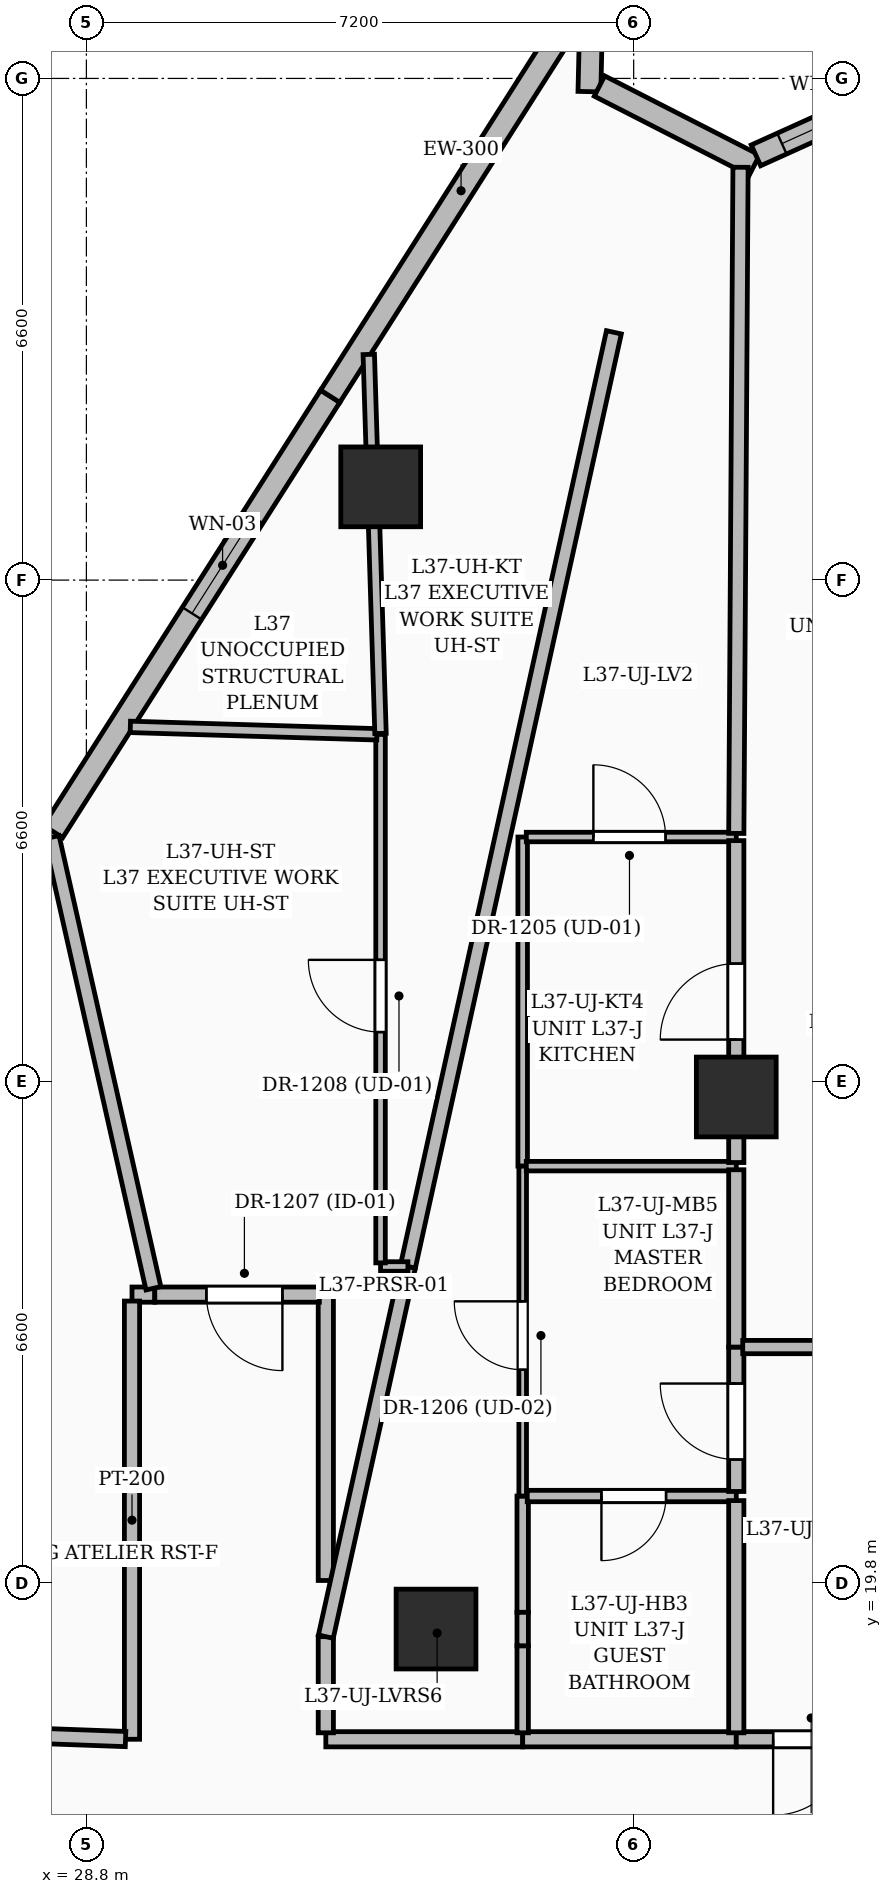
"""IFC4 building model, lengths in metres.
Left out: names, types, materials, properties, quantities, classifications, styles, units other than length and angle.
Written with IfcOpenShell. Run it as: python <this file> out.ifc"""

import sys

from ifc_helpers import new_model, si_unit, direction, frame, frame_2d, origin, origin_2d, place, context, subcontext, project, spatial, rectangle, extrude, element, fill, save


model = new_model("IFC4")
c1 = context("Model", 3, precision=1e-05, world=origin(), true_north=direction((0.0, 1.0)))
c2 = subcontext(c1, "Body", "Model", "MODEL_VIEW")
j1 = project(units=[si_unit("LENGTHUNIT", "METRE"), si_unit("PLANEANGLEUNIT", "RADIAN")], contexts=[c1])
p1 = place(None, origin())
s1 = spatial("IfcSite", under=j1, at=p1, CompositionType="ELEMENT")
p2 = place(p1, origin())
s2 = spatial("IfcBuilding", under=s1, at=p2, CompositionType="ELEMENT")
p3 = place(p2, frame((0.0, 0.0, 146.4)))
s3 = spatial("IfcBuildingStorey", under=s2, at=p3, CompositionType="ELEMENT", Elevation=146.4)
for number, where, z_axis, x_axis in (
    (1, (37.35, 26.2, 0.0), (0.0, 0.0, 1.0), (1.0, 0.0, 0.0)),
    (2, (33.4, 19.2, 0.0), (0.0, 0.0, 1.0), (1.0, 0.0, 0.0)),
    (3, (32.672, 34.227, 0.0), (0.0, 0.0, 1.0), (1.0, 0.0, 0.0)),
):
    element("IfcColumn", number, at=place(p3, frame(where, z_axis=z_axis, x_axis=x_axis)), inside=s3, PredefinedType="COLUMN", context=c2, shape_type="SweptSolid", body=[
        extrude(rectangle(XDim=1.05, YDim=1.05, at=origin_2d()), origin(), (0.0, 0.0, 1.0), 3.6),
    ])
p4 = place(p3, frame((28.361, 29.692, 0.0), z_axis=(0.0, 0.0, 1.0), x_axis=(0.537133761371, 0.843497079068, 0.0)))
e4 = element("IfcWall", 4, at=p4, inside=s3, PredefinedType="SOLIDWALL", context=c2, shape_type="SweptSolid", body=[
    extrude(rectangle(XDim=6.789, YDim=0.3, at=frame_2d((3.395, 0.0))), origin(), (0.0, 0.0, 1.0), 3.35),
])
p5 = place(p4, frame((3.403, 0.0, 0.6)))
e5 = element("IfcOpeningElement", 5, at=p5, cuts=e4, PredefinedType="OPENING", context=c2, shape_type="SweptSolid", body=[
    extrude(rectangle(XDim=1.5, YDim=2.1, at=frame_2d((0.75, 1.05))), frame((0.0, 0.16, 0.0), z_axis=(0.0, -1.0, 0.0), x_axis=(1.0, 0.0, 0.0)), (0.0, 0.0, 1.0), 0.32),
])
p6 = place(p3, frame((32.008, 35.418, 0.0), z_axis=(0.0, 0.0, 1.0), x_axis=(0.537080002797, 0.84353130979, 0.0)))
e6 = element("IfcWall", 6, at=p6, inside=s3, PredefinedType="SOLIDWALL", context=c2, shape_type="SweptSolid", body=[
    extrude(rectangle(XDim=6.411, YDim=0.3, at=frame_2d((3.206, 0.0))), origin(), (0.0, 0.0, 1.0), 3.35),
])
p7 = place(p3, frame((35.441, 40.391, 0.0), z_axis=(0.0, 0.0, 1.0), x_axis=(-0.023772687739, -0.999717389725, 0.0)))
e7 = element("IfcWall", 7, at=p7, inside=s3, PredefinedType="SOLIDWALL", context=c2, shape_type="SweptSolid", body=[
    extrude(rectangle(XDim=0.965, YDim=0.3, at=frame_2d((0.483, 0.0))), origin(), (0.0, 0.0, 1.0), 3.35),
])
p8 = place(p3, frame((35.55, 39.5, 0.0), z_axis=(0.0, 0.0, 1.0), x_axis=(0.890379913817, -0.455218199408, 0.0)))
e8 = element("IfcWall", 8, at=p8, inside=s3, PredefinedType="SOLIDWALL", context=c2, shape_type="SweptSolid", body=[
    extrude(rectangle(XDim=2.289, YDim=0.3, at=frame_2d((1.144, 0.0))), origin(), (0.0, 0.0, 1.0), 3.35),
])
p9 = place(p3, frame((37.609, 38.588, 0.0), z_axis=(0.0, 0.0, 1.0), x_axis=(0.911273073729, 0.411802604528, 0.0)))
e9 = element("IfcWall", 9, at=p9, inside=s3, PredefinedType="SOLIDWALL", context=c2, shape_type="SweptSolid", body=[
    extrude(rectangle(XDim=2.272, YDim=0.3, at=frame_2d((1.136, 0.0))), origin(), (0.0, 0.0, 1.0), 3.35),
])
p10 = place(p9, frame((0.375, 0.0, 0.8)))
e10 = element("IfcOpeningElement", 10, at=p10, cuts=e9, PredefinedType="OPENING", context=c2, shape_type="SweptSolid", body=[
    extrude(rectangle(XDim=1.2, YDim=1.8, at=frame_2d((0.6, 0.9))), frame((0.0, 0.16, 0.0), z_axis=(0.0, -1.0, 0.0), x_axis=(1.0, 0.0, 0.0)), (0.0, 0.0, 1.0), 0.32),
])
p11 = place(p3, frame((29.7, 23.6, 0.0), z_axis=(0.0, 0.0, 1.0), x_axis=(-1.0, 0.0, 0.0)))
e11 = element("IfcWall", 11, at=p11, inside=s3, PredefinedType="PARTITIONING", context=c2, shape_type="SweptSolid", body=[
    extrude(rectangle(XDim=0.3, YDim=0.2, at=frame_2d((0.15, 0.0))), origin(), (0.0, 0.0, 1.0), 2.393),
])
p12 = place(p3, frame((29.4, 23.515, 0.0), z_axis=(0.0, 0.0, 1.0), x_axis=(0.0, -1.0, 0.0)))
e12 = element("IfcWall", 12, at=p12, inside=s3, PredefinedType="PARTITIONING", context=c2, shape_type="SweptSolid", body=[
    extrude(rectangle(XDim=5.765, YDim=0.2, at=frame_2d((2.882, 0.0))), origin(), (0.0, 0.0, 1.0), 2.393),
])
p13 = place(p3, frame((29.315, 17.753, 0.0), z_axis=(0.0, 0.0, 1.0), x_axis=(-0.999333344418, 0.036508447439, 0.0)))
e13 = element("IfcWall", 13, at=p13, inside=s3, PredefinedType="PARTITIONING", context=c2, shape_type="SweptSolid", body=[
    extrude(rectangle(XDim=8.219, YDim=0.2, at=frame_2d((4.109, 0.0))), origin(), (0.0, 0.0, 1.0), 2.393),
])
p14 = place(p13, frame((3.287, 0.0, 0.0)))
e14 = element("IfcOpeningElement", 14, at=p14, cuts=e13, PredefinedType="OPENING", context=c2, shape_type="SweptSolid", body=[
    extrude(rectangle(XDim=1.6, YDim=2.3, at=frame_2d((0.8, 1.15))), frame((0.0, 0.11, 0.0), z_axis=(0.0, -1.0, 0.0), x_axis=(1.0, 0.0, 0.0)), (0.0, 0.0, 1.0), 0.22),
])
p15 = place(p3, frame((34.54, 17.75, 0.0), z_axis=(0.0, 0.0, 1.0), x_axis=(-1.0, 0.0, 0.0)))
e15 = element("IfcWall", 15, at=p15, inside=s3, PredefinedType="PARTITIONING", context=c2, shape_type="SweptSolid", body=[
    extrude(rectangle(XDim=2.59, YDim=0.2, at=frame_2d((1.295, 0.0))), origin(), (0.0, 0.0, 1.0), 2.436),
])
p16 = place(p3, frame((31.95, 17.835, 0.0), z_axis=(0.0, 0.0, 1.0), x_axis=(0.0, 1.0, 0.0)))
e16 = element("IfcWall", 16, at=p16, inside=s3, PredefinedType="PARTITIONING", context=c2, shape_type="SweptSolid", body=[
    extrude(rectangle(XDim=1.265, YDim=0.2, at=frame_2d((0.633, 0.0))), origin(), (0.0, 0.0, 1.0), 3.35),
])
p17 = place(p3, frame((37.35, 17.75, 0.0), z_axis=(0.0, 0.0, 1.0), x_axis=(-1.0, 0.0, 0.0)))
e17 = element("IfcWall", 17, at=p17, inside=s3, PredefinedType="PARTITIONING", context=c2, shape_type="SweptSolid", body=[
    extrude(rectangle(XDim=2.81, YDim=0.2, at=frame_2d((1.405, 0.0))), origin(), (0.0, 0.0, 1.0), 3.35),
])
p18 = place(p3, frame((31.95, 19.839, 0.0), z_axis=(0.0, 0.0, 1.0), x_axis=(0.0, 1.0, 0.0)))
e18 = element("IfcWall", 18, at=p18, inside=s3, PredefinedType="PARTITIONING", context=c2, shape_type="SweptSolid", body=[
    extrude(rectangle(XDim=3.761, YDim=0.2, at=frame_2d((1.88, 0.0))), origin(), (0.0, 0.0, 1.0), 2.393),
])
p19 = place(p3, frame((31.865, 23.6, 0.0), z_axis=(0.0, 0.0, 1.0), x_axis=(-1.0, 0.0, 0.0)))
e19 = element("IfcWall", 19, at=p19, inside=s3, PredefinedType="PARTITIONING", context=c2, shape_type="SweptSolid", body=[
    extrude(rectangle(XDim=2.165, YDim=0.2, at=frame_2d((1.083, 0.0))), origin(), (0.0, 0.0, 1.0), 2.787),
])
p20 = place(p19, frame((0.486, 0.0, 0.0)))
e20 = element("IfcOpeningElement", 20, at=p20, cuts=e19, PredefinedType="OPENING", context=c2, shape_type="SweptSolid", body=[
    extrude(rectangle(XDim=1.0, YDim=2.2, at=frame_2d((0.5, 1.1))), frame((0.0, 0.11, 0.0), z_axis=(0.0, -1.0, 0.0), x_axis=(1.0, 0.0, 0.0)), (0.0, 0.0, 1.0), 0.22),
])
p21 = place(p3, frame((39.32, 17.75, 0.0), z_axis=(0.0, 0.0, 1.0), x_axis=(-1.0, 0.0, 0.0)))
e21 = element("IfcWall", 21, at=p21, inside=s3, PredefinedType="PARTITIONING", context=c2, shape_type="SweptSolid", body=[
    extrude(rectangle(XDim=1.97, YDim=0.2, at=frame_2d((0.985, 0.0))), origin(), (0.0, 0.0, 1.0), 3.35),
])
p22 = place(p21, frame((0.485, 0.0, 0.0)))
e22 = element("IfcOpeningElement", 22, at=p22, cuts=e21, PredefinedType="OPENING", context=c2, shape_type="SweptSolid", body=[
    extrude(rectangle(XDim=1.0, YDim=2.2, at=frame_2d((0.5, 1.1))), frame((0.0, 0.11, 0.0), z_axis=(0.0, -1.0, 0.0), x_axis=(1.0, 0.0, 0.0)), (0.0, 0.0, 1.0), 0.22),
])
p23 = place(p3, frame((29.682, 23.683, 0.0), z_axis=(0.0, 0.0, 1.0), x_axis=(-0.22009949455, 0.97547742798, 0.0)))
e23 = element("IfcWall", 23, at=p23, inside=s3, PredefinedType="PARTITIONING", context=c2, shape_type="SweptSolid", body=[
    extrude(rectangle(XDim=6.083, YDim=0.2, at=frame_2d((3.042, 0.0))), origin(), (0.0, 0.0, 1.0), 2.57),
])
p24 = place(p3, frame((34.54, 17.835, 0.0), z_axis=(0.0, 0.0, 1.0), x_axis=(0.0, 1.0, 0.0)))
e24 = element("IfcWall", 24, at=p24, inside=s3, PredefinedType="PARTITIONING", context=c2, shape_type="SweptSolid", body=[
    extrude(rectangle(XDim=1.145, YDim=0.15, at=frame_2d((0.573, 0.0))), origin(), (0.0, 0.0, 1.0), 3.35),
])
p25 = place(p3, frame((34.54, 19.42, 0.0), z_axis=(0.0, 0.0, 1.0), x_axis=(0.0, 1.0, 0.0)))
e25 = element("IfcWall", 25, at=p25, inside=s3, PredefinedType="PARTITIONING", context=c2, shape_type="SweptSolid", body=[
    extrude(rectangle(XDim=1.53, YDim=0.15, at=frame_2d((0.765, 0.0))), origin(), (0.0, 0.0, 1.0), 2.436),
])
p26 = place(p3, frame((34.54, 25.29, 0.0), z_axis=(0.0, 0.0, 1.0), x_axis=(0.0, 1.0, 0.0)))
e26 = element("IfcWall", 26, at=p26, inside=s3, PredefinedType="PARTITIONING", context=c2, shape_type="SweptSolid", body=[
    extrude(rectangle(XDim=4.33, YDim=0.125, at=frame_2d((2.165, 0.0))), origin(), (0.0, 0.0, 1.0), 2.787),
])
p27 = place(p3, frame((34.587, 29.62, 0.0), z_axis=(0.0, 0.0, 1.0), x_axis=(1.0, 0.0, 0.0)))
e27 = element("IfcWall", 27, at=p27, inside=s3, PredefinedType="PARTITIONING", context=c2, shape_type="SweptSolid", body=[
    extrude(rectangle(XDim=2.763, YDim=0.125, at=frame_2d((1.381, 0.0))), origin(), (0.0, 0.0, 1.0), 2.393),
])
p28 = place(p27, frame((0.883, 0.0, 0.0)))
e28 = element("IfcOpeningElement", 28, at=p28, cuts=e27, PredefinedType="OPENING", context=c2, shape_type="SweptSolid", body=[
    extrude(rectangle(XDim=0.95, YDim=2.2, at=frame_2d((0.475, 1.1))), frame((0.0, 0.072, 0.0), z_axis=(0.0, -1.0, 0.0), x_axis=(1.0, 0.0, 0.0)), (0.0, 0.0, 1.0), 0.145),
])
p29 = place(p3, frame((34.54, 20.95, 0.0), z_axis=(0.0, 0.0, 1.0), x_axis=(0.0, 1.0, 0.0)))
e29 = element("IfcWall", 29, at=p29, inside=s3, PredefinedType="PARTITIONING", context=c2, shape_type="SweptSolid", body=[
    extrude(rectangle(XDim=4.34, YDim=0.1, at=frame_2d((2.17, 0.0))), origin(), (0.0, 0.0, 1.0), 2.436),
])
p30 = place(p29, frame((1.662, 0.0, 0.0)))
e30 = element("IfcOpeningElement", 30, at=p30, cuts=e29, PredefinedType="OPENING", context=c2, shape_type="SweptSolid", body=[
    extrude(rectangle(XDim=0.9, YDim=2.15, at=frame_2d((0.45, 1.075))), frame((0.0, 0.06, 0.0), z_axis=(0.0, -1.0, 0.0), x_axis=(1.0, 0.0, 0.0)), (0.0, 0.0, 1.0), 0.12),
])
p31 = place(p3, frame((33.03, 23.97, 0.0), z_axis=(0.0, 0.0, 1.0), x_axis=(-0.216526223157, -0.976276802288, 0.0)))
e31 = element("IfcWall", 31, at=p31, inside=s3, PredefinedType="PARTITIONING", context=c2, shape_type="SweptSolid", body=[
    extrude(rectangle(XDim=4.988, YDim=0.2, at=frame_2d((2.494, 0.0))), origin(), (0.0, 0.0, 1.0), 2.393),
])
p32 = place(p3, frame((35.74, 36.26, 0.0), z_axis=(0.0, 0.0, 1.0), x_axis=(-0.215328042863, -0.976541772766, 0.0)))
e32 = element("IfcWall", 32, at=p32, inside=s3, PredefinedType="PARTITIONING", context=c2, shape_type="SweptSolid", body=[
    extrude(rectangle(XDim=12.585, YDim=0.2, at=frame_2d((6.292, 0.0))), origin(), (0.0, 0.0, 1.0), 2.393),
])
p33 = place(p3, frame((37.35, 29.667, 0.0), z_axis=(0.0, 0.0, 1.0), x_axis=(0.006351731458, 0.99997982755, 0.0)))
e33 = element("IfcWall", 33, at=p33, inside=s3, PredefinedType="PARTITIONING", context=c2, shape_type="SweptSolid", body=[
    extrude(rectangle(XDim=8.764, YDim=0.2, at=frame_2d((4.382, 0.0))), origin(), (0.0, 0.0, 1.0), 2.57),
])
p34 = place(p3, frame((37.35, 20.95, 0.0), z_axis=(0.0, 0.0, 1.0), x_axis=(-1.0, 0.0, 0.0)))
e34 = element("IfcWall", 34, at=p34, inside=s3, PredefinedType="PARTITIONING", context=c2, shape_type="SweptSolid", body=[
    extrude(rectangle(XDim=2.75, YDim=0.15, at=frame_2d((1.375, 0.0))), origin(), (0.0, 0.0, 1.0), 2.436),
])
p35 = place(p34, frame((0.924, 0.0, 0.0)))
e35 = element("IfcOpeningElement", 35, at=p35, cuts=e34, PredefinedType="OPENING", context=c2, shape_type="SweptSolid", body=[
    extrude(rectangle(XDim=0.85, YDim=2.1, at=frame_2d((0.425, 1.05))), frame((0.0, 0.085, 0.0), z_axis=(0.0, -1.0, 0.0), x_axis=(1.0, 0.0, 0.0)), (0.0, 0.0, 1.0), 0.17),
])
p36 = place(p3, frame((37.35, 17.835, 0.0), z_axis=(0.0, 0.0, 1.0), x_axis=(0.0, 1.0, 0.0)))
e36 = element("IfcWall", 36, at=p36, inside=s3, PredefinedType="PARTITIONING", context=c2, shape_type="SweptSolid", body=[
    extrude(rectangle(XDim=3.055, YDim=0.2, at=frame_2d((1.527, 0.0))), origin(), (0.0, 0.0, 1.0), 2.853),
])
p37 = place(p3, frame((34.587, 25.29, 0.0), z_axis=(0.0, 0.0, 1.0), x_axis=(1.0, 0.0, 0.0)))
e37 = element("IfcWall", 37, at=p37, inside=s3, PredefinedType="PARTITIONING", context=c2, shape_type="SweptSolid", body=[
    extrude(rectangle(XDim=2.763, YDim=0.125, at=frame_2d((1.381, 0.0))), origin(), (0.0, 0.0, 1.0), 2.436),
])
p38 = place(p3, frame((37.35, 25.337, 0.0), z_axis=(0.0, 0.0, 1.0), x_axis=(0.0, 1.0, 0.0)))
e38 = element("IfcWall", 38, at=p38, inside=s3, PredefinedType="PARTITIONING", context=c2, shape_type="SweptSolid", body=[
    extrude(rectangle(XDim=4.235, YDim=0.2, at=frame_2d((2.118, 0.0))), origin(), (0.0, 0.0, 1.0), 2.787),
])
p39 = place(p38, frame((1.617, 0.0, 0.0)))
e39 = element("IfcOpeningElement", 39, at=p39, cuts=e38, PredefinedType="OPENING", context=c2, shape_type="SweptSolid", body=[
    extrude(rectangle(XDim=1.0, YDim=2.2, at=frame_2d((0.5, 1.1))), frame((0.0, 0.11, 0.0), z_axis=(0.0, -1.0, 0.0), x_axis=(1.0, 0.0, 0.0)), (0.0, 0.0, 1.0), 0.22),
])
p40 = place(p3, frame((37.35, 21.01, 0.0), z_axis=(0.0, 0.0, 1.0), x_axis=(0.0, 1.0, 0.0)))
e40 = element("IfcWall", 40, at=p40, inside=s3, PredefinedType="PARTITIONING", context=c2, shape_type="SweptSolid", body=[
    extrude(rectangle(XDim=1.9, YDim=0.2, at=frame_2d((0.95, 0.0))), origin(), (0.0, 0.0, 1.0), 3.35),
])
p41 = place(p40, frame((0.42, 0.0, 0.0)))
e41 = element("IfcOpeningElement", 41, at=p41, cuts=e40, PredefinedType="OPENING", context=c2, shape_type="SweptSolid", body=[
    extrude(rectangle(XDim=1.0, YDim=2.2, at=frame_2d((0.5, 1.1))), frame((0.0, 0.11, 0.0), z_axis=(0.0, -1.0, 0.0), x_axis=(1.0, 0.0, 0.0)), (0.0, 0.0, 1.0), 0.22),
])
p42 = place(p3, frame((37.35, 22.91, 0.0), z_axis=(0.0, 0.0, 1.0), x_axis=(0.0, 1.0, 0.0)))
e42 = element("IfcWall", 42, at=p42, inside=s3, PredefinedType="PARTITIONING", context=c2, shape_type="SweptSolid", body=[
    extrude(rectangle(XDim=2.333, YDim=0.2, at=frame_2d((1.166, 0.0))), origin(), (0.0, 0.0, 1.0), 3.35),
])
p43 = place(p3, frame((33.03, 23.97, 0.0), z_axis=(0.0, 0.0, 1.0), x_axis=(-1.0, 0.0, 0.0)))
e43 = element("IfcWall", 43, at=p43, inside=s3, PredefinedType="PARTITIONING", context=c2, shape_type="SweptSolid", body=[
    extrude(rectangle(XDim=0.36, YDim=0.125, at=frame_2d((0.18, 0.0))), origin(), (0.0, 0.0, 1.0), 3.35),
])
p44 = place(p3, frame((32.67, 24.018, 0.0), z_axis=(0.0, 0.0, 1.0), x_axis=(0.0, 1.0, 0.0)))
e44 = element("IfcWall", 44, at=p44, inside=s3, PredefinedType="PARTITIONING", context=c2, shape_type="SweptSolid", body=[
    extrude(rectangle(XDim=6.952, YDim=0.125, at=frame_2d((3.476, 0.0))), origin(), (0.0, 0.0, 1.0), 2.787),
])
p45 = place(p44, frame((3.036, 0.0, 0.0)))
e45 = element("IfcOpeningElement", 45, at=p45, cuts=e44, PredefinedType="OPENING", context=c2, shape_type="SweptSolid", body=[
    extrude(rectangle(XDim=0.95, YDim=2.2, at=frame_2d((0.475, 1.1))), frame((0.0, 0.072, 0.0), z_axis=(0.0, -1.0, 0.0), x_axis=(1.0, 0.0, 0.0)), (0.0, 0.0, 1.0), 0.145),
])
p46 = place(p3, frame((32.623, 30.971, 0.0), z_axis=(0.0, 0.0, 1.0), x_axis=(-0.999545103735, 0.03015933684, 0.0)))
e46 = element("IfcWall", 46, at=p46, inside=s3, PredefinedType="PARTITIONING", context=c2, shape_type="SweptSolid", body=[
    extrude(rectangle(XDim=3.246, YDim=0.15, at=frame_2d((1.623, 0.0))), origin(), (0.0, 0.0, 1.0), 2.57),
])
p47 = place(p3, frame((32.515, 35.969, 0.0), z_axis=(0.0, 0.0, 1.0), x_axis=(0.031025448674, -0.999518594892, 0.0)))
e47 = element("IfcWall", 47, at=p47, inside=s3, PredefinedType="PARTITIONING", context=c2, shape_type="SweptSolid", body=[
    extrude(rectangle(XDim=4.989, YDim=0.15, at=frame_2d((2.495, 0.0))), origin(), (0.0, 0.0, 1.0), 2.57),
])
p48 = place(p3, frame((39.272, 22.91, 0.0), z_axis=(0.0, 0.0, 1.0), x_axis=(-1.0, 0.0, 0.0)))
e48 = element("IfcWall", 48, at=p48, inside=s3, PredefinedType="PARTITIONING", context=c2, shape_type="SweptSolid", body=[
    extrude(rectangle(XDim=1.837, YDim=0.175, at=frame_2d((0.919, 0.0))), origin(), (0.0, 0.0, 1.0), 3.35),
])
p49 = place(p3, frame((34.54, 19.42, 0.0), z_axis=(0.0, 0.0, 1.0), x_axis=(0.0, -1.0, 0.0)))
e49 = element("IfcWall", 49, at=p49, inside=s3, PredefinedType="PARTITIONING", context=c2, shape_type="SweptSolid", body=[
    extrude(rectangle(XDim=0.44, YDim=0.15, at=frame_2d((0.22, 0.0))), origin(), (0.0, 0.0, 1.0), 2.853),
])
p50 = place(p5, origin())
e50 = element("IfcWindow", 50, at=p50, inside=s3, PartitioningType="SINGLE_PANEL", PredefinedType="WINDOW", context=c2, shape_type="SweptSolid", body=[
    extrude(rectangle(XDim=1.5, YDim=2.1, at=frame_2d((0.75, 1.05))), frame((0.0, 0.03, 0.0), z_axis=(0.0, -1.0, 0.0), x_axis=(1.0, 0.0, 0.0)), (0.0, 0.0, 1.0), 0.06),
])
fill(e5, e50)
p51 = place(p10, origin())
e51 = element("IfcWindow", 51, at=p51, inside=s3, PartitioningType="SINGLE_PANEL", PredefinedType="WINDOW", context=c2, shape_type="SweptSolid", body=[
    extrude(rectangle(XDim=1.2, YDim=1.8, at=frame_2d((0.6, 0.9))), frame((0.0, 0.03, 0.0), z_axis=(0.0, -1.0, 0.0), x_axis=(1.0, 0.0, 0.0)), (0.0, 0.0, 1.0), 0.06),
])
fill(e10, e51)
p52 = place(p28, origin())
e52 = element("IfcDoor", 52, at=p52, inside=s3, OperationType="SINGLE_SWING_LEFT", PredefinedType="DOOR", context=c2, shape_type="SweptSolid", body=[
    extrude(rectangle(XDim=0.95, YDim=2.2, at=frame_2d((0.475, 1.1))), frame((0.0, 0.025, 0.0), z_axis=(0.0, -1.0, 0.0), x_axis=(1.0, 0.0, 0.0)), (0.0, 0.0, 1.0), 0.05),
])
fill(e28, e52)
p53 = place(p30, origin())
e53 = element("IfcDoor", 53, at=p53, inside=s3, OperationType="SINGLE_SWING_RIGHT", PredefinedType="DOOR", context=c2, shape_type="SweptSolid", body=[
    extrude(rectangle(XDim=0.9, YDim=2.15, at=frame_2d((0.45, 1.075))), frame((0.0, 0.025, 0.0), z_axis=(0.0, -1.0, 0.0), x_axis=(1.0, 0.0, 0.0)), (0.0, 0.0, 1.0), 0.05),
])
fill(e30, e53)
p54 = place(p20, origin())
e54 = element("IfcDoor", 54, at=p54, inside=s3, OperationType="SINGLE_SWING_LEFT", PredefinedType="DOOR", context=c2, shape_type="SweptSolid", body=[
    extrude(rectangle(XDim=1.0, YDim=2.2, at=frame_2d((0.5, 1.1))), frame((0.0, 0.025, 0.0), z_axis=(0.0, -1.0, 0.0), x_axis=(1.0, 0.0, 0.0)), (0.0, 0.0, 1.0), 0.05),
])
fill(e20, e54)
p55 = place(p45, origin())
e55 = element("IfcDoor", 55, at=p55, inside=s3, OperationType="SINGLE_SWING_RIGHT", PredefinedType="DOOR", context=c2, shape_type="SweptSolid", body=[
    extrude(rectangle(XDim=0.95, YDim=2.2, at=frame_2d((0.475, 1.1))), frame((0.0, 0.025, 0.0), z_axis=(0.0, -1.0, 0.0), x_axis=(1.0, 0.0, 0.0)), (0.0, 0.0, 1.0), 0.05),
])
fill(e45, e55)
p56 = place(p22, origin())
e56 = element("IfcDoor", 56, at=p56, inside=s3, OperationType="SINGLE_SWING_RIGHT", PredefinedType="DOOR", context=c2, shape_type="SweptSolid", body=[
    extrude(rectangle(XDim=1.0, YDim=2.2, at=frame_2d((0.5, 1.1))), frame((0.0, 0.025, 0.0), z_axis=(0.0, -1.0, 0.0), x_axis=(1.0, 0.0, 0.0)), (0.0, 0.0, 1.0), 0.05),
])
fill(e22, e56)
p57 = place(p41, origin())
e57 = element("IfcDoor", 57, at=p57, inside=s3, OperationType="SINGLE_SWING_RIGHT", PredefinedType="DOOR", context=c2, shape_type="SweptSolid", body=[
    extrude(rectangle(XDim=1.0, YDim=2.2, at=frame_2d((0.5, 1.1))), frame((0.0, 0.025, 0.0), z_axis=(0.0, -1.0, 0.0), x_axis=(1.0, 0.0, 0.0)), (0.0, 0.0, 1.0), 0.05),
])
fill(e41, e57)
p58 = place(p35, origin())
e58 = element("IfcDoor", 58, at=p58, inside=s3, OperationType="SINGLE_SWING_RIGHT", PredefinedType="DOOR", context=c2, shape_type="SweptSolid", body=[
    extrude(rectangle(XDim=0.85, YDim=2.1, at=frame_2d((0.425, 1.05))), frame((0.0, 0.025, 0.0), z_axis=(0.0, -1.0, 0.0), x_axis=(1.0, 0.0, 0.0)), (0.0, 0.0, 1.0), 0.05),
])
fill(e35, e58)
p59 = place(p39, origin())
e59 = element("IfcDoor", 59, at=p59, inside=s3, OperationType="SINGLE_SWING_LEFT", PredefinedType="DOOR", context=c2, shape_type="SweptSolid", body=[
    extrude(rectangle(XDim=1.0, YDim=2.2, at=frame_2d((0.5, 1.1))), frame((0.0, 0.025, 0.0), z_axis=(0.0, -1.0, 0.0), x_axis=(1.0, 0.0, 0.0)), (0.0, 0.0, 1.0), 0.05),
])
fill(e39, e59)
save(model, sys.argv[1])
